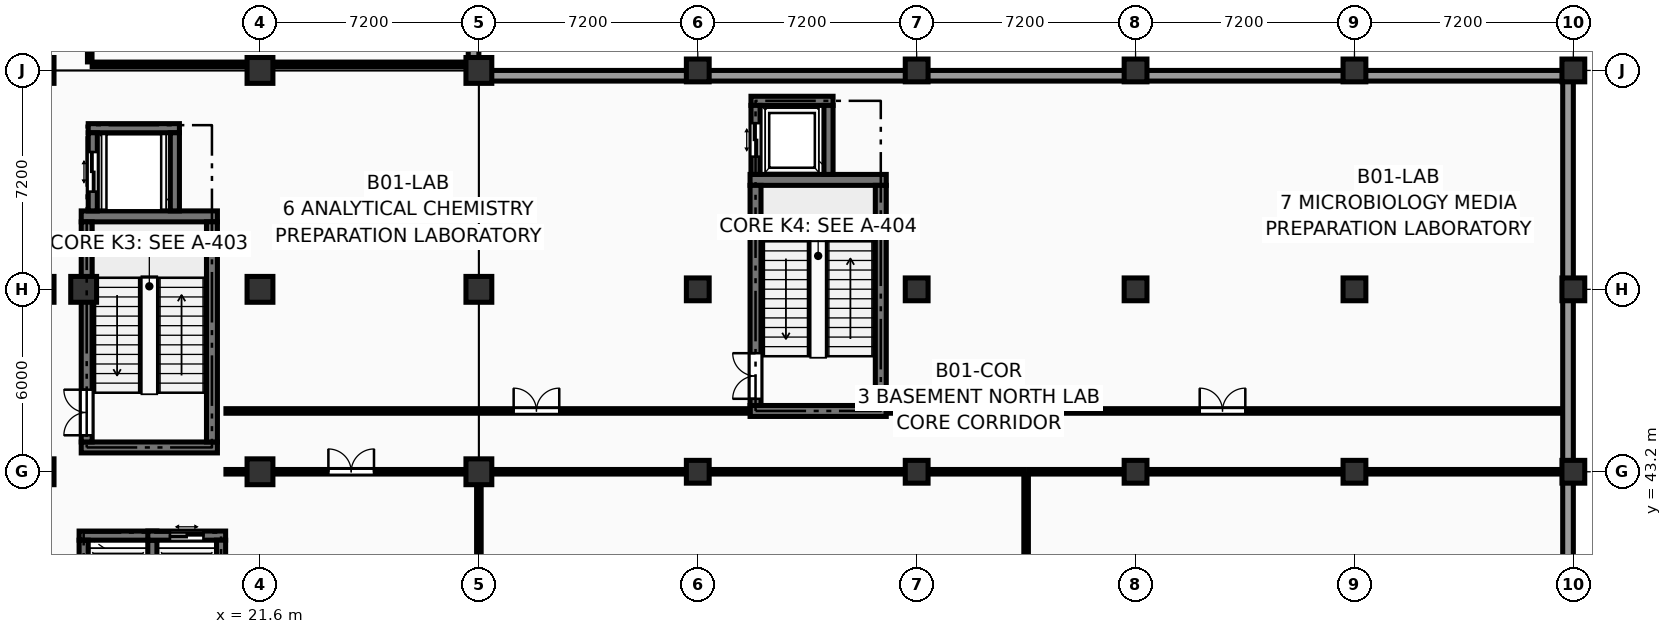
"""IFC4 building model, lengths in metres.
Left out: names, types, materials, properties, quantities, classifications, styles, units other than length and angle.
Written with IfcOpenShell. Run it as: python <this file> out.ifc"""

import sys

from ifc_helpers import new_model, si_unit, direction, frame, frame_2d, origin, origin_2d, place, context, subcontext, project, spatial, rectangle, extrude, element, fill, save


model = new_model("IFC4")
c1 = context("Model", 3, precision=1e-05, world=origin(), true_north=direction((0.0, 1.0)))
c2 = subcontext(c1, "Body", "Model", "MODEL_VIEW")
j1 = project(units=[si_unit("LENGTHUNIT", "METRE"), si_unit("PLANEANGLEUNIT", "RADIAN")], contexts=[c1])
p1 = place(None, origin())
s1 = spatial("IfcSite", under=j1, at=p1, CompositionType="ELEMENT")
p2 = place(p1, origin())
s2 = spatial("IfcBuilding", under=s1, at=p2, CompositionType="ELEMENT")
p3 = place(p2, frame((0.0, 0.0, -4.5)))
s3 = spatial("IfcBuildingStorey", under=s2, at=p3, CompositionType="ELEMENT", Elevation=-4.5)
for number, where, z_axis, x_axis in (
    (1, (14.4, 43.2, 0.0), (0.0, 0.0, 1.0), (1.0, 0.0, 0.0)),
    (2, (14.4, 49.2, 0.0), (0.0, 0.0, 1.0), (1.0, 0.0, 0.0)),
    (3, (14.4, 56.4, 0.0), (0.0, 0.0, 1.0), (1.0, 0.0, 0.0)),
    (4, (15.8, 49.2, 0.0), (0.0, 0.0, 1.0), (1.0, 0.0, 0.0)),
    (5, (21.6, 43.2, 0.0), (0.0, 0.0, 1.0), (1.0, 0.0, 0.0)),
    (6, (21.6, 49.2, 0.0), (0.0, 0.0, 1.0), (1.0, 0.0, 0.0)),
    (7, (21.6, 56.4, 0.0), (0.0, 0.0, 1.0), (1.0, 0.0, 0.0)),
):
    element("IfcColumn", number, at=place(p3, frame(where, z_axis=z_axis, x_axis=x_axis)), inside=s3, PredefinedType="COLUMN", context=c2, shape_type="SweptSolid", body=[
        extrude(rectangle(XDim=0.85, YDim=0.85, at=origin_2d()), origin(), (0.0, 0.0, 1.0), 4.5),
    ])
for number, where, z_axis, x_axis in (
    (8, (28.8, 43.2, -0.3), (0.0, 0.0, 1.0), (1.0, 0.0, 0.0)),
    (9, (28.8, 49.2, -0.3), (0.0, 0.0, 1.0), (1.0, 0.0, 0.0)),
    (10, (28.8, 56.4, -0.3), (0.0, 0.0, 1.0), (1.0, 0.0, 0.0)),
):
    element("IfcColumn", number, at=place(p3, frame(where, z_axis=z_axis, x_axis=x_axis)), inside=s3, PredefinedType="COLUMN", context=c2, shape_type="SweptSolid", body=[
        extrude(rectangle(XDim=0.85, YDim=0.85, at=origin_2d()), origin(), (0.0, 0.0, 1.0), 4.8),
    ])
for number, where, z_axis, x_axis in (
    (11, (36.0, 43.2, 0.0), (0.0, 0.0, 1.0), (1.0, 0.0, 0.0)),
    (12, (36.0, 49.2, 0.0), (0.0, 0.0, 1.0), (1.0, 0.0, 0.0)),
    (13, (36.0, 56.4, 0.0), (0.0, 0.0, 1.0), (1.0, 0.0, 0.0)),
    (14, (43.2, 43.2, 0.0), (0.0, 0.0, 1.0), (1.0, 0.0, 0.0)),
    (15, (43.2, 49.2, 0.0), (0.0, 0.0, 1.0), (1.0, 0.0, 0.0)),
    (16, (43.2, 56.4, 0.0), (0.0, 0.0, 1.0), (1.0, 0.0, 0.0)),
):
    element("IfcColumn", number, at=place(p3, frame(where, z_axis=z_axis, x_axis=x_axis)), inside=s3, PredefinedType="COLUMN", context=c2, shape_type="SweptSolid", body=[
        extrude(rectangle(XDim=0.75, YDim=0.75, at=origin_2d()), origin(), (0.0, 0.0, 1.0), 4.5),
    ])
for number, where, z_axis, x_axis in (
    (17, (50.4, 43.2, -0.3), (0.0, 0.0, 1.0), (1.0, 0.0, 0.0)),
    (18, (50.4, 49.2, -0.3), (0.0, 0.0, 1.0), (1.0, 0.0, 0.0)),
    (19, (50.4, 56.4, -0.3), (0.0, 0.0, 1.0), (1.0, 0.0, 0.0)),
    (20, (57.6, 43.2, -0.3), (0.0, 0.0, 1.0), (1.0, 0.0, 0.0)),
    (21, (57.6, 49.2, -0.3), (0.0, 0.0, 1.0), (1.0, 0.0, 0.0)),
    (22, (57.6, 56.4, -0.3), (0.0, 0.0, 1.0), (1.0, 0.0, 0.0)),
    (23, (64.8, 43.2, -0.3), (0.0, 0.0, 1.0), (1.0, 0.0, 0.0)),
    (24, (64.8, 49.2, -0.3), (0.0, 0.0, 1.0), (1.0, 0.0, 0.0)),
    (25, (64.8, 56.4, -0.3), (0.0, 0.0, 1.0), (1.0, 0.0, 0.0)),
):
    element("IfcColumn", number, at=place(p3, frame(where, z_axis=z_axis, x_axis=x_axis)), inside=s3, PredefinedType="COLUMN", context=c2, shape_type="SweptSolid", body=[
        extrude(rectangle(XDim=0.75, YDim=0.75, at=origin_2d()), origin(), (0.0, 0.0, 1.0), 4.8),
    ])
p4 = place(p3, frame((28.625, 85.2, -0.3), z_axis=(0.0, 0.0, 1.0), x_axis=(0.0, -1.0, 0.0)))
e26 = element("IfcWall", 26, at=p4, inside=s3, PredefinedType="USERDEFINED", context=c2, shape_type="SweptSolid", body=[
    extrude(rectangle(XDim=28.8, YDim=0.35, at=frame_2d((14.4, 0.0))), origin(), (0.0, 0.0, 1.0), 4.54),
])
p5 = place(p3, frame((28.8, 56.225, -0.3), z_axis=(0.0, 0.0, 1.0), x_axis=(1.0, 0.0, 0.0)))
e27 = element("IfcWall", 27, at=p5, inside=s3, PredefinedType="USERDEFINED", context=c2, shape_type="SweptSolid", body=[
    extrude(rectangle(XDim=36.0, YDim=0.35, at=frame_2d((18.0, 0.0))), origin(), (0.0, 0.0, 1.0), 4.54),
])
p6 = place(p3, frame((64.625, 56.4, -0.3), z_axis=(0.0, 0.0, 1.0), x_axis=(0.0, -1.0, 0.0)))
e28 = element("IfcWall", 28, at=p6, inside=s3, PredefinedType="USERDEFINED", context=c2, shape_type="SweptSolid", body=[
    extrude(rectangle(XDim=27.6, YDim=0.35, at=frame_2d((13.8, 0.0))), origin(), (0.0, 0.0, 1.0), 4.54),
])
for number, where, z_axis, x_axis in (
    (29, (15.72, 44.0, -0.3), (0.0, 0.0, 1.0), (1.0, 0.0, 0.0)),
    (30, (15.72, 51.6, -0.3), (0.0, 0.0, 1.0), (1.0, 0.0, 0.0)),
):
    element("IfcWall", number, at=place(p3, frame(where, z_axis=z_axis, x_axis=x_axis)), inside=s3, PredefinedType="SHEAR", context=c2, shape_type="SweptSolid", body=[
        extrude(rectangle(XDim=4.48, YDim=0.36, at=frame_2d((2.24, 0.0))), origin(), (0.0, 0.0, 1.0), 4.54),
    ])
p7 = place(p3, frame((15.9, 44.18, -0.3), z_axis=(0.0, 0.0, 1.0), x_axis=(0.0, 1.0, 0.0)))
e31 = element("IfcWall", 31, at=p7, inside=s3, PredefinedType="SHEAR", context=c2, shape_type="SweptSolid", body=[
    extrude(rectangle(XDim=7.24, YDim=0.36, at=frame_2d((3.62, 0.0))), origin(), (0.0, 0.0, 1.0), 4.54),
])
p8 = place(p7, frame((0.22, 0.0, 0.3)))
e32 = element("IfcOpeningElement", 32, at=p8, cuts=e31, PredefinedType="OPENING", context=c2, shape_type="SweptSolid", body=[
    extrude(rectangle(XDim=1.5, YDim=2.2, at=frame_2d((0.75, 1.1))), frame((0.0, 0.192, 0.0), z_axis=(0.0, -1.0, 0.0), x_axis=(1.0, 0.0, 0.0)), (0.0, 0.0, 1.0), 0.384),
])
p9 = place(p3, frame((20.02, 44.18, -0.3), z_axis=(0.0, 0.0, 1.0), x_axis=(0.0, 1.0, 0.0)))
e33 = element("IfcWall", 33, at=p9, inside=s3, PredefinedType="SHEAR", context=c2, shape_type="SweptSolid", body=[
    extrude(rectangle(XDim=7.24, YDim=0.36, at=frame_2d((3.62, 0.0))), origin(), (0.0, 0.0, 1.0), 4.54),
])
for number, where, z_axis, x_axis in (
    (34, (37.72, 45.2, -0.3), (0.0, 0.0, 1.0), (1.0, 0.0, 0.0)),
    (35, (37.72, 52.8, -0.3), (0.0, 0.0, 1.0), (1.0, 0.0, 0.0)),
):
    element("IfcWall", number, at=place(p3, frame(where, z_axis=z_axis, x_axis=x_axis)), inside=s3, PredefinedType="SHEAR", context=c2, shape_type="SweptSolid", body=[
        extrude(rectangle(XDim=4.48, YDim=0.36, at=frame_2d((2.24, 0.0))), origin(), (0.0, 0.0, 1.0), 4.54),
    ])
p10 = place(p3, frame((37.9, 45.38, -0.3), z_axis=(0.0, 0.0, 1.0), x_axis=(0.0, 1.0, 0.0)))
e36 = element("IfcWall", 36, at=p10, inside=s3, PredefinedType="SHEAR", context=c2, shape_type="SweptSolid", body=[
    extrude(rectangle(XDim=7.24, YDim=0.36, at=frame_2d((3.62, 0.0))), origin(), (0.0, 0.0, 1.0), 4.54),
])
p11 = place(p10, frame((0.22, 0.0, 0.3)))
e37 = element("IfcOpeningElement", 37, at=p11, cuts=e36, PredefinedType="OPENING", context=c2, shape_type="SweptSolid", body=[
    extrude(rectangle(XDim=1.5, YDim=2.2, at=frame_2d((0.75, 1.1))), frame((0.0, 0.192, 0.0), z_axis=(0.0, -1.0, 0.0), x_axis=(1.0, 0.0, 0.0)), (0.0, 0.0, 1.0), 0.384),
])
p12 = place(p3, frame((42.02, 45.38, -0.3), z_axis=(0.0, 0.0, 1.0), x_axis=(0.0, 1.0, 0.0)))
e38 = element("IfcWall", 38, at=p12, inside=s3, PredefinedType="SHEAR", context=c2, shape_type="SweptSolid", body=[
    extrude(rectangle(XDim=7.24, YDim=0.36, at=frame_2d((3.62, 0.0))), origin(), (0.0, 0.0, 1.0), 4.54),
])
p13 = place(p3, frame((15.65, 41.1, -1.6), z_axis=(0.0, 0.0, 1.0), x_axis=(1.0, 0.0, 0.0)))
e39 = element("IfcWall", 39, at=p13, inside=s3, PredefinedType="SHEAR", context=c2, shape_type="SweptSolid", body=[
    extrude(rectangle(XDim=2.56, YDim=0.3, at=frame_2d((1.28, 0.0))), origin(), (0.0, 0.0, 1.0), 5.84),
])
p14 = place(p3, frame((15.8, 37.98, -1.6), z_axis=(0.0, 0.0, 1.0), x_axis=(0.0, 1.0, 0.0)))
e40 = element("IfcWall", 40, at=p14, inside=s3, PredefinedType="SHEAR", context=c2, shape_type="SweptSolid", body=[
    extrude(rectangle(XDim=2.97, YDim=0.3, at=frame_2d((1.485, 0.0))), origin(), (0.0, 0.0, 1.0), 5.84),
])
p15 = place(p14, frame((0.935, 0.0, 1.6)))
e41 = element("IfcOpeningElement", 41, at=p15, cuts=e40, PredefinedType="OPENING", context=c2, shape_type="SweptSolid", body=[
    extrude(rectangle(XDim=1.1, YDim=2.2, at=frame_2d((0.55, 1.1))), frame((0.0, 0.162, 0.0), z_axis=(0.0, -1.0, 0.0), x_axis=(1.0, 0.0, 0.0)), (0.0, 0.0, 1.0), 0.324),
])
p16 = place(p3, frame((18.06, 37.98, -1.6), z_axis=(0.0, 0.0, 1.0), x_axis=(0.0, 1.0, 0.0)))
e42 = element("IfcWall", 42, at=p16, inside=s3, PredefinedType="SHEAR", context=c2, shape_type="SweptSolid", body=[
    extrude(rectangle(XDim=2.97, YDim=0.3, at=frame_2d((1.485, 0.0))), origin(), (0.0, 0.0, 1.0), 5.84),
])
p17 = place(p3, frame((17.91, 41.1, -1.6), z_axis=(0.0, 0.0, 1.0), x_axis=(1.0, 0.0, 0.0)))
e43 = element("IfcWall", 43, at=p17, inside=s3, PredefinedType="SHEAR", context=c2, shape_type="SweptSolid", body=[
    extrude(rectangle(XDim=2.56, YDim=0.3, at=frame_2d((1.28, 0.0))), origin(), (0.0, 0.0, 1.0), 5.84),
])
p18 = place(p17, frame((0.73, 0.0, 1.6)))
e44 = element("IfcOpeningElement", 44, at=p18, cuts=e43, PredefinedType="OPENING", context=c2, shape_type="SweptSolid", body=[
    extrude(rectangle(XDim=1.1, YDim=2.2, at=frame_2d((0.55, 1.1))), frame((0.0, 0.162, 0.0), z_axis=(0.0, -1.0, 0.0), x_axis=(1.0, 0.0, 0.0)), (0.0, 0.0, 1.0), 0.324),
])
p19 = place(p3, frame((20.32, 37.98, -1.6), z_axis=(0.0, 0.0, 1.0), x_axis=(0.0, 1.0, 0.0)))
e45 = element("IfcWall", 45, at=p19, inside=s3, PredefinedType="SHEAR", context=c2, shape_type="SweptSolid", body=[
    extrude(rectangle(XDim=2.97, YDim=0.3, at=frame_2d((1.485, 0.0))), origin(), (0.0, 0.0, 1.0), 5.84),
])
p20 = place(p3, frame((37.75, 55.4, -1.6), z_axis=(0.0, 0.0, 1.0), x_axis=(1.0, 0.0, 0.0)))
e46 = element("IfcWall", 46, at=p20, inside=s3, PredefinedType="SHEAR", context=c2, shape_type="SweptSolid", body=[
    extrude(rectangle(XDim=2.7, YDim=0.3, at=frame_2d((1.35, 0.0))), origin(), (0.0, 0.0, 1.0), 5.84),
])
p21 = place(p3, frame((37.9, 52.98, -1.6), z_axis=(0.0, 0.0, 1.0), x_axis=(0.0, 1.0, 0.0)))
e47 = element("IfcWall", 47, at=p21, inside=s3, PredefinedType="SHEAR", context=c2, shape_type="SweptSolid", body=[
    extrude(rectangle(XDim=2.27, YDim=0.3, at=frame_2d((1.135, 0.0))), origin(), (0.0, 0.0, 1.0), 5.84),
])
p22 = place(p21, frame((0.585, 0.0, 1.6)))
e48 = element("IfcOpeningElement", 48, at=p22, cuts=e47, PredefinedType="OPENING", context=c2, shape_type="SweptSolid", body=[
    extrude(rectangle(XDim=1.1, YDim=2.2, at=frame_2d((0.55, 1.1))), frame((0.0, 0.162, 0.0), z_axis=(0.0, -1.0, 0.0), x_axis=(1.0, 0.0, 0.0)), (0.0, 0.0, 1.0), 0.324),
])
p23 = place(p3, frame((40.3, 52.98, -1.6), z_axis=(0.0, 0.0, 1.0), x_axis=(0.0, 1.0, 0.0)))
e49 = element("IfcWall", 49, at=p23, inside=s3, PredefinedType="SHEAR", context=c2, shape_type="SweptSolid", body=[
    extrude(rectangle(XDim=2.27, YDim=0.3, at=frame_2d((1.135, 0.0))), origin(), (0.0, 0.0, 1.0), 5.84),
])
p24 = place(p3, frame((15.95, 54.5, -1.6), z_axis=(0.0, 0.0, 1.0), x_axis=(1.0, 0.0, 0.0)))
e50 = element("IfcWall", 50, at=p24, inside=s3, PredefinedType="SHEAR", context=c2, shape_type="SweptSolid", body=[
    extrude(rectangle(XDim=3.0, YDim=0.3, at=frame_2d((1.5, 0.0))), origin(), (0.0, 0.0, 1.0), 5.84),
])
p25 = place(p3, frame((16.1, 51.78, -1.6), z_axis=(0.0, 0.0, 1.0), x_axis=(0.0, 1.0, 0.0)))
e51 = element("IfcWall", 51, at=p25, inside=s3, PredefinedType="SHEAR", context=c2, shape_type="SweptSolid", body=[
    extrude(rectangle(XDim=2.57, YDim=0.3, at=frame_2d((1.285, 0.0))), origin(), (0.0, 0.0, 1.0), 5.84),
])
p26 = place(p25, frame((0.635, 0.0, 1.6)))
e52 = element("IfcOpeningElement", 52, at=p26, cuts=e51, PredefinedType="OPENING", context=c2, shape_type="SweptSolid", body=[
    extrude(rectangle(XDim=1.3, YDim=2.25, at=frame_2d((0.65, 1.125))), frame((0.0, 0.162, 0.0), z_axis=(0.0, -1.0, 0.0), x_axis=(1.0, 0.0, 0.0)), (0.0, 0.0, 1.0), 0.324),
])
p27 = place(p3, frame((18.8, 51.78, -1.6), z_axis=(0.0, 0.0, 1.0), x_axis=(0.0, 1.0, 0.0)))
e53 = element("IfcWall", 53, at=p27, inside=s3, PredefinedType="SHEAR", context=c2, shape_type="SweptSolid", body=[
    extrude(rectangle(XDim=2.57, YDim=0.3, at=frame_2d((1.285, 0.0))), origin(), (0.0, 0.0, 1.0), 5.84),
])
p28 = place(p3, frame((28.8, 27.68, 0.0), z_axis=(0.0, 0.0, 1.0), x_axis=(0.0, 1.0, 0.0)))
e54 = element("IfcWall", 54, at=p28, inside=s3, PredefinedType="PARTITIONING", context=c2, shape_type="SweptSolid", body=[
    extrude(rectangle(XDim=15.44, YDim=0.15, at=frame_2d((7.72, 0.0))), origin(), (0.0, 0.0, 1.0), 3.375),
])
p29 = place(p3, frame((20.48, 43.2, 0.0), z_axis=(0.0, 0.0, 1.0), x_axis=(1.0, 0.0, 0.0)))
e55 = element("IfcWall", 55, at=p29, inside=s3, PredefinedType="PARTITIONING", context=c2, shape_type="SweptSolid", body=[
    extrude(rectangle(XDim=8.24, YDim=0.15, at=frame_2d((4.12, 0.0))), origin(), (0.0, 0.0, 1.0), 3.375),
])
p30 = place(p29, frame((3.37, 0.0, 0.0)))
e56 = element("IfcOpeningElement", 56, at=p30, cuts=e55, PredefinedType="OPENING", context=c2, shape_type="SweptSolid", body=[
    extrude(rectangle(XDim=1.5, YDim=2.2, at=frame_2d((0.75, 1.1))), frame((0.0, 0.087, 0.0), z_axis=(0.0, -1.0, 0.0), x_axis=(1.0, 0.0, 0.0)), (0.0, 0.0, 1.0), 0.174),
])
p31 = place(p3, frame((46.8, 9.68, 0.0), z_axis=(0.0, 0.0, 1.0), x_axis=(0.0, 1.0, 0.0)))
e57 = element("IfcWall", 57, at=p31, inside=s3, PredefinedType="PARTITIONING", context=c2, shape_type="SweptSolid", body=[
    extrude(rectangle(XDim=33.44, YDim=0.15, at=frame_2d((16.72, 0.0))), origin(), (0.0, 0.0, 1.0), 4.225),
])
p32 = place(p3, frame((28.88, 43.2, 0.0), z_axis=(0.0, 0.0, 1.0), x_axis=(1.0, 0.0, 0.0)))
e58 = element("IfcWall", 58, at=p32, inside=s3, PredefinedType="PARTITIONING", context=c2, shape_type="SweptSolid", body=[
    extrude(rectangle(XDim=17.84, YDim=0.15, at=frame_2d((8.92, 0.0))), origin(), (0.0, 0.0, 1.0), 3.375),
])
p33 = place(p3, frame((46.88, 43.2, 0.0), z_axis=(0.0, 0.0, 1.0), x_axis=(1.0, 0.0, 0.0)))
e59 = element("IfcWall", 59, at=p33, inside=s3, PredefinedType="PARTITIONING", context=c2, shape_type="SweptSolid", body=[
    extrude(rectangle(XDim=17.44, YDim=0.15, at=frame_2d((8.72, 0.0))), origin(), (0.0, 0.0, 1.0), 3.375),
])
p34 = place(p3, frame((20.48, 45.2, 0.0), z_axis=(0.0, 0.0, 1.0), x_axis=(1.0, 0.0, 0.0)))
e60 = element("IfcWall", 60, at=p34, inside=s3, PredefinedType="PARTITIONING", context=c2, shape_type="SweptSolid", body=[
    extrude(rectangle(XDim=17.24, YDim=0.15, at=frame_2d((8.62, 0.0))), origin(), (0.0, 0.0, 1.0), 4.225),
])
p35 = place(p34, frame((9.464, 0.0, 0.0)))
e61 = element("IfcOpeningElement", 61, at=p35, cuts=e60, PredefinedType="OPENING", context=c2, shape_type="SweptSolid", body=[
    extrude(rectangle(XDim=1.5, YDim=2.2, at=frame_2d((0.75, 1.1))), frame((0.0, 0.087, 0.0), z_axis=(0.0, -1.0, 0.0), x_axis=(1.0, 0.0, 0.0)), (0.0, 0.0, 1.0), 0.174),
])
p36 = place(p3, frame((42.2, 45.2, 0.0), z_axis=(0.0, 0.0, 1.0), x_axis=(1.0, 0.0, 0.0)))
e62 = element("IfcWall", 62, at=p36, inside=s3, PredefinedType="PARTITIONING", context=c2, shape_type="SweptSolid", body=[
    extrude(rectangle(XDim=22.12, YDim=0.15, at=frame_2d((11.06, 0.0))), origin(), (0.0, 0.0, 1.0), 4.225),
])
p37 = place(p36, frame((10.31, 0.0, 0.0)))
e63 = element("IfcOpeningElement", 63, at=p37, cuts=e62, PredefinedType="OPENING", context=c2, shape_type="SweptSolid", body=[
    extrude(rectangle(XDim=1.5, YDim=2.2, at=frame_2d((0.75, 1.1))), frame((0.0, 0.087, 0.0), z_axis=(0.0, -1.0, 0.0), x_axis=(1.0, 0.0, 0.0)), (0.0, 0.0, 1.0), 0.174),
])
p38 = place(p3, frame((16.0, 56.68, 0.0), z_axis=(0.0, 0.0, 1.0), x_axis=(0.0, 1.0, 0.0)))
e64 = element("IfcWall", 64, at=p38, inside=s3, PredefinedType="PARTITIONING", context=c2, shape_type="SweptSolid", body=[
    extrude(rectangle(XDim=15.1, YDim=0.15, at=frame_2d((7.55, 0.0))), origin(), (0.0, 0.0, 1.0), 4.225),
])
p39 = place(p38, frame((8.445, 0.0, 0.0)))
e65 = element("IfcOpeningElement", 65, at=p39, cuts=e64, PredefinedType="OPENING", context=c2, shape_type="SweptSolid", body=[
    extrude(rectangle(XDim=1.5, YDim=2.2, at=frame_2d((0.75, 1.1))), frame((0.0, 0.087, 0.0), z_axis=(0.0, -1.0, 0.0), x_axis=(1.0, 0.0, 0.0)), (0.0, 0.0, 1.0), 0.174),
])
p40 = place(p3, frame((16.08, 56.6, 0.0), z_axis=(0.0, 0.0, 1.0), x_axis=(1.0, 0.0, 0.0)))
e66 = element("IfcWall", 66, at=p40, inside=s3, PredefinedType="PARTITIONING", context=c2, shape_type="SweptSolid", body=[
    extrude(rectangle(XDim=12.24, YDim=0.15, at=frame_2d((6.12, 0.0))), origin(), (0.0, 0.0, 1.0), 3.375),
])
p41 = place(p8, origin())
e67 = element("IfcDoor", 67, at=p41, inside=s3, OperationType="DOUBLE_DOOR_SINGLE_SWING", PredefinedType="DOOR", context=c2, shape_type="SweptSolid", body=[
    extrude(rectangle(XDim=1.5, YDim=2.2, at=frame_2d((0.75, 1.1))), frame((0.0, 0.025, 0.0), z_axis=(0.0, -1.0, 0.0), x_axis=(1.0, 0.0, 0.0)), (0.0, 0.0, 1.0), 0.05),
])
fill(e32, e67)
p42 = place(p11, origin())
e68 = element("IfcDoor", 68, at=p42, inside=s3, OperationType="DOUBLE_DOOR_SINGLE_SWING", PredefinedType="DOOR", context=c2, shape_type="SweptSolid", body=[
    extrude(rectangle(XDim=1.5, YDim=2.2, at=frame_2d((0.75, 1.1))), frame((0.0, 0.025, 0.0), z_axis=(0.0, -1.0, 0.0), x_axis=(1.0, 0.0, 0.0)), (0.0, 0.0, 1.0), 0.05),
])
fill(e37, e68)
p43 = place(p18, origin())
e69 = element("IfcDoor", 69, at=p43, inside=s3, OperationType="DOUBLE_DOOR_SLIDING", PredefinedType="DOOR", context=c2, shape_type="SweptSolid", body=[
    extrude(rectangle(XDim=1.1, YDim=2.2, at=frame_2d((0.55, 1.1))), frame((0.0, 0.025, 0.0), z_axis=(0.0, -1.0, 0.0), x_axis=(1.0, 0.0, 0.0)), (0.0, 0.0, 1.0), 0.05),
])
fill(e44, e69)
p44 = place(p22, origin())
e70 = element("IfcDoor", 70, at=p44, inside=s3, OperationType="DOUBLE_DOOR_SLIDING", PredefinedType="DOOR", context=c2, shape_type="SweptSolid", body=[
    extrude(rectangle(XDim=1.1, YDim=2.2, at=frame_2d((0.55, 1.1))), frame((0.0, 0.025, 0.0), z_axis=(0.0, -1.0, 0.0), x_axis=(1.0, 0.0, 0.0)), (0.0, 0.0, 1.0), 0.05),
])
fill(e48, e70)
p45 = place(p26, origin())
e71 = element("IfcDoor", 71, at=p45, inside=s3, OperationType="DOUBLE_DOOR_SLIDING", PredefinedType="DOOR", context=c2, shape_type="SweptSolid", body=[
    extrude(rectangle(XDim=1.3, YDim=2.25, at=frame_2d((0.65, 1.125))), frame((0.0, 0.025, 0.0), z_axis=(0.0, -1.0, 0.0), x_axis=(1.0, 0.0, 0.0)), (0.0, 0.0, 1.0), 0.05),
])
fill(e52, e71)
p46 = place(p30, origin())
e72 = element("IfcDoor", 72, at=p46, inside=s3, OperationType="DOUBLE_DOOR_SINGLE_SWING", PredefinedType="DOOR", context=c2, shape_type="SweptSolid", body=[
    extrude(rectangle(XDim=1.5, YDim=2.2, at=frame_2d((0.75, 1.1))), frame((0.0, 0.025, 0.0), z_axis=(0.0, -1.0, 0.0), x_axis=(1.0, 0.0, 0.0)), (0.0, 0.0, 1.0), 0.05),
])
fill(e56, e72)
p47 = place(p35, origin())
e73 = element("IfcDoor", 73, at=p47, inside=s3, OperationType="DOUBLE_DOOR_SINGLE_SWING", PredefinedType="DOOR", context=c2, shape_type="SweptSolid", body=[
    extrude(rectangle(XDim=1.5, YDim=2.2, at=frame_2d((0.75, 1.1))), frame((0.0, 0.025, 0.0), z_axis=(0.0, -1.0, 0.0), x_axis=(1.0, 0.0, 0.0)), (0.0, 0.0, 1.0), 0.05),
])
fill(e61, e73)
p48 = place(p37, origin())
e74 = element("IfcDoor", 74, at=p48, inside=s3, OperationType="DOUBLE_DOOR_SINGLE_SWING", PredefinedType="DOOR", context=c2, shape_type="SweptSolid", body=[
    extrude(rectangle(XDim=1.5, YDim=2.2, at=frame_2d((0.75, 1.1))), frame((0.0, 0.025, 0.0), z_axis=(0.0, -1.0, 0.0), x_axis=(1.0, 0.0, 0.0)), (0.0, 0.0, 1.0), 0.05),
])
fill(e63, e74)
save(model, sys.argv[1])
